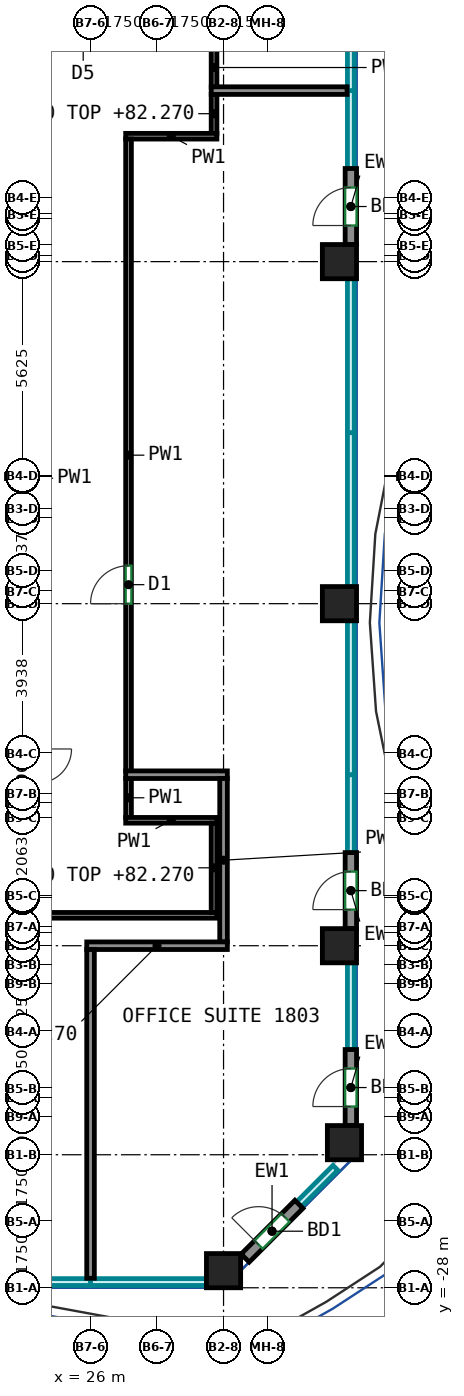
"""IFC4 building model, lengths in metres.
Left out: names, types, materials, properties, quantities, classifications, styles, units other than length and angle.
Written with IfcOpenShell. Run it as: python <this file> out.ifc"""

import sys

from ifc_helpers import new_model, si_unit, direction, frame, frame_2d, origin, origin_2d, place, context, subcontext, project, spatial, rectangle, extrude, source, transform, mapped, element, fill, save


model = new_model("IFC4")
c1 = context("Model", 3, precision=1e-05, world=origin(), true_north=direction((0.0, 1.0)))
c2 = subcontext(c1, "Body", "Model", "MODEL_VIEW")
j1 = project(units=[si_unit("LENGTHUNIT", "METRE"), si_unit("PLANEANGLEUNIT", "RADIAN")], contexts=[c1])
p1 = place(None, origin())
s1 = spatial("IfcSite", under=j1, at=p1, CompositionType="ELEMENT")
p2 = place(p1, origin())
s2 = spatial("IfcBuilding", under=s1, at=p2, CompositionType="ELEMENT")
p3 = place(p2, frame((0.0, 0.0, 79.2)))
s3 = spatial("IfcBuildingStorey", under=s2, at=p3, CompositionType="ELEMENT", Elevation=79.2)
m1 = source(origin(), c2, "Body", "SweptSolid", [
    extrude(rectangle(XDim=0.9, YDim=0.9, at=origin_2d()), origin(), (0.0, 0.0, 1.0), 3.72),
])
for number, where, z_axis, x_axis in (
    (1, (29.5, -27.55, 0.0), (0.0, 0.0, 1.0), (1.0, 0.0, 0.0)),
    (2, (32.55, -19.0, 0.0), (0.0, 0.0, 1.0), (1.0, 0.0, 0.0)),
    (3, (32.55, -10.0, 0.0), (0.0, 0.0, 1.0), (1.0, 0.0, 0.0)),
    (4, (32.55, -1.0, 0.0), (0.0, 0.0, 1.0), (1.0, 0.0, 0.0)),
    (5, (32.682, -24.182, 0.0), (0.0, 0.0, 1.0), (1.0, 0.0, 0.0)),
):
    element("IfcColumn", number, at=place(p3, frame(where, z_axis=z_axis, x_axis=x_axis)), inside=s3, PredefinedType="COLUMN", context=c2, shape_type="MappedRepresentation", body=[
        mapped(m1, transform((0.0, 0.0, 0.0))),
    ])
m2 = source(origin(), c2, "Body", "SweptSolid", [
    extrude(rectangle(XDim=2.0, YDim=0.3, at=frame_2d((1.0, 0.0))), origin(), (0.0, 0.0, 1.0), 3.72),
])
p4 = place(p3, frame((30.069, -27.219, 0.0), z_axis=(0.0, 0.0, 1.0), x_axis=(0.707106781187, 0.707106781187, 0.0)))
e6 = element("IfcWall", 6, at=p4, inside=s3, PredefinedType="SOLIDWALL", context=c2, shape_type="MappedRepresentation", body=[
    mapped(m2, transform((0.0, 0.0, 0.0))),
])
p5 = place(p4, frame((0.5, 0.0, 0.0)))
e7 = element("IfcOpeningElement", 7, at=p5, cuts=e6, PredefinedType="OPENING", context=c2, shape_type="SweptSolid", body=[
    extrude(rectangle(XDim=1.0, YDim=2.1, at=frame_2d((0.5, 1.05))), frame((0.0, 0.16, 0.0), z_axis=(0.0, -1.0, 0.0), x_axis=(1.0, 0.0, 0.0)), (0.0, 0.0, 1.0), 0.32),
])
m3 = source(origin(), c2, "Body", "SweptSolid", [
    extrude(rectangle(XDim=2.0, YDim=0.3, at=frame_2d((1.0, 0.0))), origin(), (0.0, 0.0, 1.0), 3.72),
])
p6 = place(p3, frame((32.85, -23.732, 0.0), z_axis=(0.0, 0.0, 1.0), x_axis=(0.0, 1.0, 0.0)))
e8 = element("IfcWall", 8, at=p6, inside=s3, PredefinedType="SOLIDWALL", context=c2, shape_type="MappedRepresentation", body=[
    mapped(m3, transform((0.0, 0.0, 0.0))),
])
p7 = place(p6, frame((0.5, 0.0, 0.0)))
e9 = element("IfcOpeningElement", 9, at=p7, cuts=e8, PredefinedType="OPENING", context=c2, shape_type="SweptSolid", body=[
    extrude(rectangle(XDim=1.0, YDim=2.1, at=frame_2d((0.5, 1.05))), frame((0.0, 0.16, 0.0), z_axis=(0.0, -1.0, 0.0), x_axis=(1.0, 0.0, 0.0)), (0.0, 0.0, 1.0), 0.32),
])
p8 = place(p3, frame((32.85, -18.55, 0.0), z_axis=(0.0, 0.0, 1.0), x_axis=(0.0, 1.0, 0.0)))
e10 = element("IfcWall", 10, at=p8, inside=s3, PredefinedType="SOLIDWALL", context=c2, shape_type="MappedRepresentation", body=[
    mapped(m3, transform((0.0, 0.0, 0.0))),
])
p9 = place(p8, frame((0.5, 0.0, 0.0)))
e11 = element("IfcOpeningElement", 11, at=p9, cuts=e10, PredefinedType="OPENING", context=c2, shape_type="SweptSolid", body=[
    extrude(rectangle(XDim=1.0, YDim=2.1, at=frame_2d((0.5, 1.05))), frame((0.0, 0.16, 0.0), z_axis=(0.0, -1.0, 0.0), x_axis=(1.0, 0.0, 0.0)), (0.0, 0.0, 1.0), 0.32),
])
p10 = place(p3, frame((32.85, -0.55, 0.0), z_axis=(0.0, 0.0, 1.0), x_axis=(0.0, 1.0, 0.0)))
e12 = element("IfcWall", 12, at=p10, inside=s3, PredefinedType="SOLIDWALL", context=c2, shape_type="MappedRepresentation", body=[
    mapped(m3, transform((0.0, 0.0, 0.0))),
])
p11 = place(p10, frame((0.5, 0.0, 0.0)))
e13 = element("IfcOpeningElement", 13, at=p11, cuts=e12, PredefinedType="OPENING", context=c2, shape_type="SweptSolid", body=[
    extrude(rectangle(XDim=1.0, YDim=2.1, at=frame_2d((0.5, 1.05))), frame((0.0, 0.16, 0.0), z_axis=(0.0, -1.0, 0.0), x_axis=(1.0, 0.0, 0.0)), (0.0, 0.0, 1.0), 0.32),
])
p12 = place(p3, frame((-19.325, -18.2, 0.0), z_axis=(0.0, 0.0, 1.0), x_axis=(1.0, 0.0, 0.0)))
e14 = element("IfcWall", 14, at=p12, inside=s3, PredefinedType="PARTITIONING", context=c2, shape_type="SweptSolid", body=[
    extrude(rectangle(XDim=48.65, YDim=0.15, at=frame_2d((24.325, 0.0))), origin(), (0.0, 0.0, 1.0), 3.72),
])
p13 = place(p12, frame((12.221, 0.0, 0.0)))
e15 = element("IfcOpeningElement", 15, at=p13, cuts=e14, PredefinedType="OPENING", context=c2, shape_type="SweptSolid", body=[
    extrude(rectangle(XDim=0.9, YDim=2.1, at=frame_2d((0.45, 1.05))), frame((0.0, 0.085, 0.0), z_axis=(0.0, -1.0, 0.0), x_axis=(1.0, 0.0, 0.0)), (0.0, 0.0, 1.0), 0.17),
])
p14 = place(p12, frame((26.229, 0.0, 0.0)))
e16 = element("IfcOpeningElement", 16, at=p14, cuts=e14, PredefinedType="OPENING", context=c2, shape_type="SweptSolid", body=[
    extrude(rectangle(XDim=0.9, YDim=2.1, at=frame_2d((0.45, 1.05))), frame((0.0, 0.085, 0.0), z_axis=(0.0, -1.0, 0.0), x_axis=(1.0, 0.0, 0.0)), (0.0, 0.0, 1.0), 0.17),
])
p15 = place(p12, frame((38.029, 0.0, 0.0)))
e17 = element("IfcOpeningElement", 17, at=p15, cuts=e14, PredefinedType="OPENING", context=c2, shape_type="SweptSolid", body=[
    extrude(rectangle(XDim=0.9, YDim=2.1, at=frame_2d((0.45, 1.05))), frame((0.0, 0.085, 0.0), z_axis=(0.0, -1.0, 0.0), x_axis=(1.0, 0.0, 0.0)), (0.0, 0.0, 1.0), 0.17),
])
p16 = place(p3, frame((27.0, -15.625, 0.0), z_axis=(0.0, 0.0, 1.0), x_axis=(0.0, 1.0, 0.0)))
e18 = element("IfcWall", 18, at=p16, inside=s3, PredefinedType="PARTITIONING", context=c2, shape_type="SweptSolid", body=[
    extrude(rectangle(XDim=1.035, YDim=0.15, at=frame_2d((0.518, 0.0))), origin(), (0.0, 0.0, 1.0), 3.72),
])
p17 = place(p3, frame((26.925, -15.7, 0.0), z_axis=(0.0, 0.0, 1.0), x_axis=(1.0, 0.0, 0.0)))
e19 = element("IfcWall", 19, at=p17, inside=s3, PredefinedType="PARTITIONING", context=c2, shape_type="SweptSolid", body=[
    extrude(rectangle(XDim=2.4, YDim=0.15, at=frame_2d((1.2, 0.0))), origin(), (0.0, 0.0, 1.0), 3.72),
])
p18 = place(p3, frame((29.25, -18.125, 0.0), z_axis=(0.0, 0.0, 1.0), x_axis=(0.0, 1.0, 0.0)))
e20 = element("IfcWall", 20, at=p18, inside=s3, PredefinedType="PARTITIONING", context=c2, shape_type="SweptSolid", body=[
    extrude(rectangle(XDim=2.35, YDim=0.15, at=frame_2d((1.175, 0.0))), origin(), (0.0, 0.0, 1.0), 3.07),
])
for number, where, z_axis, x_axis in (
    (21, (29.25, 3.59, 0.0), (0.0, 0.0, 1.0), (0.0, 1.0, 0.0)),
    (22, (29.25, 2.375, 0.0), (0.0, 0.0, 1.0), (0.0, 1.0, 0.0)),
):
    element("IfcWall", number, at=place(p3, frame(where, z_axis=z_axis, x_axis=x_axis)), inside=s3, PredefinedType="PARTITIONING", context=c2, shape_type="SweptSolid", body=[
        extrude(rectangle(XDim=1.035, YDim=0.15, at=frame_2d((0.518, 0.0))), origin(), (0.0, 0.0, 1.0), 3.07),
    ])
p19 = place(p3, frame((26.925, 2.3, 0.0), z_axis=(0.0, 0.0, 1.0), x_axis=(1.0, 0.0, 0.0)))
e23 = element("IfcWall", 23, at=p19, inside=s3, PredefinedType="PARTITIONING", context=c2, shape_type="SweptSolid", body=[
    extrude(rectangle(XDim=2.4, YDim=0.15, at=frame_2d((1.2, 0.0))), origin(), (0.0, 0.0, 1.0), 3.72),
])
p20 = place(p3, frame((27.0, -14.41, 0.0), z_axis=(0.0, 0.0, 1.0), x_axis=(0.0, 1.0, 0.0)))
e24 = element("IfcWall", 24, at=p20, inside=s3, PredefinedType="PARTITIONING", context=c2, shape_type="SweptSolid", body=[
    extrude(rectangle(XDim=16.635, YDim=0.15, at=frame_2d((8.317, 0.0))), origin(), (0.0, 0.0, 1.0), 3.72),
])
p21 = place(p20, frame((4.41, 0.0, 0.0)))
e25 = element("IfcOpeningElement", 25, at=p21, cuts=e24, PredefinedType="OPENING", context=c2, shape_type="SweptSolid", body=[
    extrude(rectangle(XDim=1.0, YDim=2.1, at=frame_2d((0.5, 1.05))), frame((0.0, 0.085, 0.0), z_axis=(0.0, -1.0, 0.0), x_axis=(1.0, 0.0, 0.0)), (0.0, 0.0, 1.0), 0.17),
])
p22 = place(p3, frame((26.926, -14.5, 0.0), z_axis=(0.0, 0.0, 1.0), x_axis=(1.0, 0.0, 0.0)))
e26 = element("IfcWall", 26, at=p22, inside=s3, PredefinedType="PARTITIONING", context=c2, shape_type="SweptSolid", body=[
    extrude(rectangle(XDim=2.674, YDim=0.2, at=frame_2d((1.337, 0.0))), origin(), (0.0, 0.0, 1.0), 3.72),
])
p23 = place(p3, frame((29.5, -18.9, 0.0), z_axis=(0.0, 0.0, 1.0), x_axis=(0.0, 1.0, 0.0)))
e27 = element("IfcWall", 27, at=p23, inside=s3, PredefinedType="PARTITIONING", context=c2, shape_type="SweptSolid", body=[
    extrude(rectangle(XDim=4.3, YDim=0.2, at=frame_2d((2.15, 0.0))), origin(), (0.0, 0.0, 1.0), 3.07),
])
p24 = place(p3, frame((25.9, -19.0, 0.0), z_axis=(0.0, 0.0, 1.0), x_axis=(1.0, 0.0, 0.0)))
e28 = element("IfcWall", 28, at=p24, inside=s3, PredefinedType="PARTITIONING", context=c2, shape_type="SweptSolid", body=[
    extrude(rectangle(XDim=3.7, YDim=0.2, at=frame_2d((1.85, 0.0))), origin(), (0.0, 0.0, 1.0), 3.07),
])
p25 = place(p3, frame((26.0, -27.75, 0.0), z_axis=(0.0, 0.0, 1.0), x_axis=(0.0, 1.0, 0.0)))
e29 = element("IfcWall", 29, at=p25, inside=s3, PredefinedType="PARTITIONING", context=c2, shape_type="SweptSolid", body=[
    extrude(rectangle(XDim=8.65, YDim=0.2, at=frame_2d((4.325, 0.0))), origin(), (0.0, 0.0, 1.0), 3.72),
])
p26 = place(p3, frame((29.176, 3.5, 0.0), z_axis=(0.0, 0.0, 1.0), x_axis=(1.0, 0.0, 0.0)))
e30 = element("IfcWall", 30, at=p26, inside=s3, PredefinedType="PARTITIONING", context=c2, shape_type="SweptSolid", body=[
    extrude(rectangle(XDim=3.574, YDim=0.2, at=frame_2d((1.787, 0.0))), origin(), (0.0, 0.0, 1.0), 3.72),
])
p27 = place(p5, origin())
e31 = element("IfcDoor", 31, at=p27, inside=s3, OperationType="SINGLE_SWING_LEFT", PredefinedType="DOOR", context=c2, shape_type="SweptSolid", body=[
    extrude(rectangle(XDim=1.0, YDim=2.1, at=frame_2d((0.5, 1.05))), frame((0.0, 0.025, 0.0), z_axis=(0.0, -1.0, 0.0), x_axis=(1.0, 0.0, 0.0)), (0.0, 0.0, 1.0), 0.05),
])
fill(e7, e31)
p28 = place(p7, origin())
e32 = element("IfcDoor", 32, at=p28, inside=s3, OperationType="SINGLE_SWING_LEFT", PredefinedType="DOOR", context=c2, shape_type="SweptSolid", body=[
    extrude(rectangle(XDim=1.0, YDim=2.1, at=frame_2d((0.5, 1.05))), frame((0.0, 0.025, 0.0), z_axis=(0.0, -1.0, 0.0), x_axis=(1.0, 0.0, 0.0)), (0.0, 0.0, 1.0), 0.05),
])
fill(e9, e32)
p29 = place(p9, origin())
e33 = element("IfcDoor", 33, at=p29, inside=s3, OperationType="SINGLE_SWING_LEFT", PredefinedType="DOOR", context=c2, shape_type="SweptSolid", body=[
    extrude(rectangle(XDim=1.0, YDim=2.1, at=frame_2d((0.5, 1.05))), frame((0.0, 0.025, 0.0), z_axis=(0.0, -1.0, 0.0), x_axis=(1.0, 0.0, 0.0)), (0.0, 0.0, 1.0), 0.05),
])
fill(e11, e33)
p30 = place(p11, origin())
e34 = element("IfcDoor", 34, at=p30, inside=s3, OperationType="SINGLE_SWING_LEFT", PredefinedType="DOOR", context=c2, shape_type="SweptSolid", body=[
    extrude(rectangle(XDim=1.0, YDim=2.1, at=frame_2d((0.5, 1.05))), frame((0.0, 0.025, 0.0), z_axis=(0.0, -1.0, 0.0), x_axis=(1.0, 0.0, 0.0)), (0.0, 0.0, 1.0), 0.05),
])
fill(e13, e34)
p31 = place(p21, origin())
e35 = element("IfcDoor", 35, at=p31, inside=s3, OperationType="SINGLE_SWING_LEFT", PredefinedType="DOOR", context=c2, shape_type="SweptSolid", body=[
    extrude(rectangle(XDim=1.0, YDim=2.1, at=frame_2d((0.5, 1.05))), frame((0.0, 0.025, 0.0), z_axis=(0.0, -1.0, 0.0), x_axis=(1.0, 0.0, 0.0)), (0.0, 0.0, 1.0), 0.05),
])
fill(e25, e35)
save(model, sys.argv[1])
